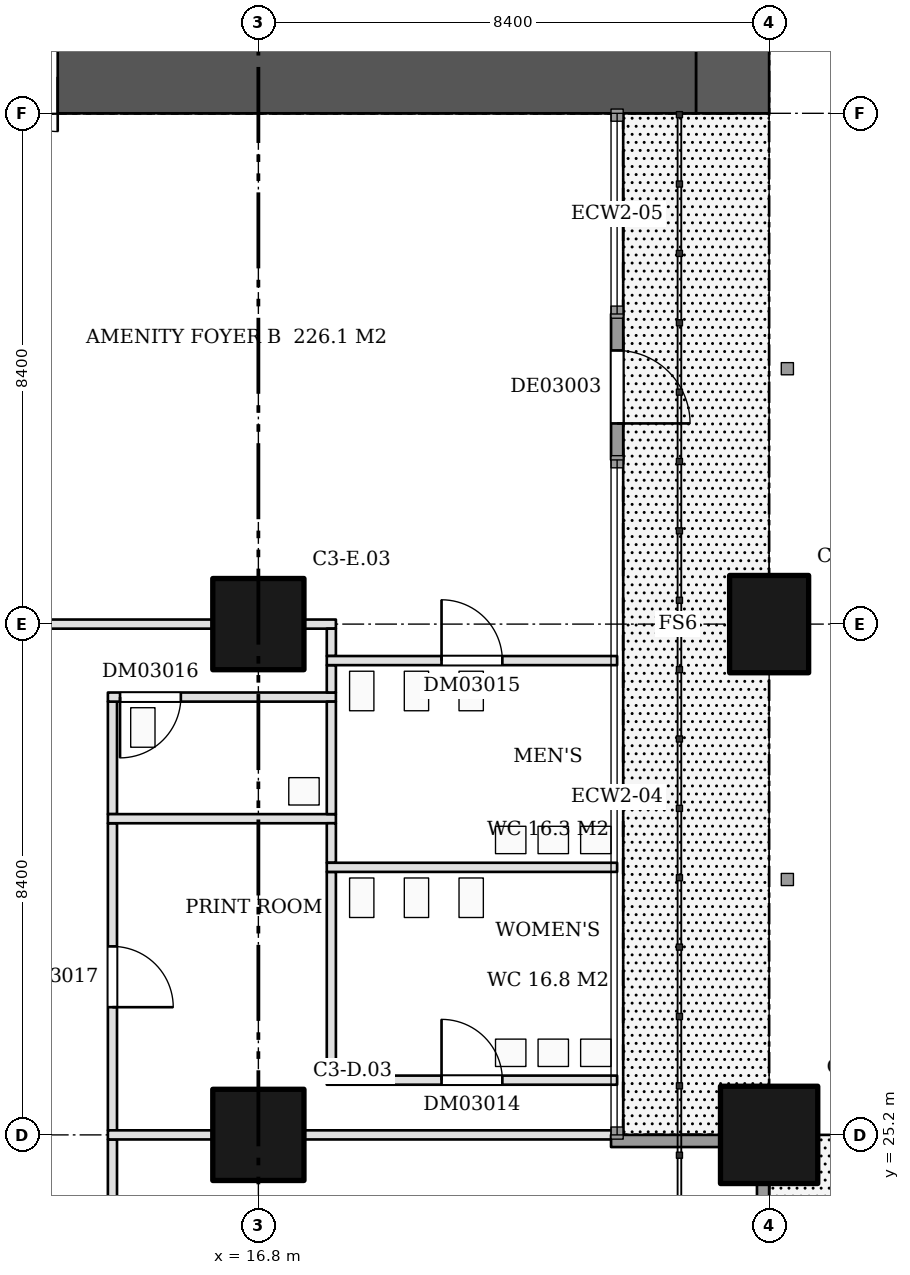
"""IFC4 building model, lengths in metres.
Left out: names, types, materials, properties, quantities, classifications, styles, units other than length and angle.
Written with IfcOpenShell. Run it as: python <this file> out.ifc"""

import sys

from ifc_helpers import new_model, si_unit, direction, frame, frame_2d, origin, origin_2d, place, context, subcontext, project, spatial, rectangle, extrude, element, fill, save


model = new_model("IFC4")
c1 = context("Model", 3, precision=1e-05, world=origin(), true_north=direction((0.0, 1.0)))
c2 = subcontext(c1, "Body", "Model", "MODEL_VIEW")
j1 = project(units=[si_unit("LENGTHUNIT", "METRE"), si_unit("PLANEANGLEUNIT", "RADIAN")], contexts=[c1])
p1 = place(None, origin())
s1 = spatial("IfcSite", under=j1, at=p1, CompositionType="ELEMENT")
p2 = place(p1, origin())
s2 = spatial("IfcBuilding", under=s1, at=p2, CompositionType="ELEMENT")
p3 = place(p2, frame((0.0, 0.0, 19.8)))
s3 = spatial("IfcBuildingStorey", under=s2, at=p3, CompositionType="ELEMENT", Elevation=19.8)
for number, where, z_axis, x_axis in (
    (1, (16.8, 25.2, 0.0), (0.0, 0.0, 1.0), (1.0, 0.0, 0.0)),
    (2, (16.8, 33.6, 0.0), (0.0, 0.0, 1.0), (1.0, 0.0, 0.0)),
):
    element("IfcColumn", number, at=place(p3, frame(where, z_axis=z_axis, x_axis=x_axis)), inside=s3, PredefinedType="COLUMN", context=c2, shape_type="SweptSolid", body=[
        extrude(rectangle(XDim=1.5, YDim=1.5, at=origin_2d()), origin(), (0.0, 0.0, 1.0), 5.12),
    ])
p4 = place(p3, frame((25.2, 25.2, 0.0), z_axis=(0.0, 0.0, 1.0), x_axis=(1.0, 0.0, 0.0)))
e3 = element("IfcColumn", 3, at=p4, inside=s3, PredefinedType="COLUMN", context=c2, shape_type="SweptSolid", body=[
    extrude(rectangle(XDim=1.6, YDim=1.6, at=origin_2d()), origin(), (0.0, 0.0, 1.0), 5.12),
])
p5 = place(p3, frame((25.2, 33.6, 0.0), z_axis=(0.0, 0.0, 1.0), x_axis=(0.0, 1.0, 0.0)))
e4 = element("IfcColumn", 4, at=p5, inside=s3, PredefinedType="COLUMN", context=c2, shape_type="SweptSolid", body=[
    extrude(rectangle(XDim=1.6, YDim=1.3, at=origin_2d()), origin(), (0.0, 0.0, 1.0), 5.12),
])
p6 = place(p3, frame((24.6, 58.8, 0.0), z_axis=(0.0, 0.0, 1.0), x_axis=(0.0, -1.0, 0.0)))
e5 = element("IfcWall", 5, at=p6, inside=s3, PredefinedType="SHEAR", context=c2, shape_type="SweptSolid", body=[
    extrude(rectangle(XDim=16.8, YDim=1.2, at=frame_2d((8.4, 0.0))), origin(), (0.0, 0.0, 1.0), 5.12),
])
p7 = place(p6, frame((1.8, 0.0, 0.5)))
e6 = element("IfcOpeningElement", 6, at=p7, cuts=e5, PredefinedType="OPENING", context=c2, shape_type="SweptSolid", body=[
    extrude(rectangle(XDim=1.8, YDim=2.4, at=frame_2d((0.9, 1.2))), frame((0.0, 0.61, 0.0), z_axis=(0.0, -1.0, 0.0), x_axis=(1.0, 0.0, 0.0)), (0.0, 0.0, 1.0), 1.22),
])
p8 = place(p6, frame((4.644, 0.0, 1.6)))
e7 = element("IfcOpeningElement", 7, at=p8, cuts=e5, PredefinedType="OPENING", context=c2, shape_type="SweptSolid", body=[
    extrude(rectangle(XDim=1.2, YDim=1.2, at=frame_2d((0.6, 0.6))), frame((0.0, 0.61, 0.0), z_axis=(0.0, -1.0, 0.0), x_axis=(1.0, 0.0, 0.0)), (0.0, 0.0, 1.0), 1.22),
])
p9 = place(p6, frame((6.45, 0.0, 1.6)))
e8 = element("IfcOpeningElement", 8, at=p9, cuts=e5, PredefinedType="OPENING", context=c2, shape_type="SweptSolid", body=[
    extrude(rectangle(XDim=1.8, YDim=1.2, at=frame_2d((0.9, 0.6))), frame((0.0, 0.61, 0.0), z_axis=(0.0, -1.0, 0.0), x_axis=(1.0, 0.0, 0.0)), (0.0, 0.0, 1.0), 1.22),
])
p10 = place(p6, frame((12.65, 0.0, 0.5)))
e9 = element("IfcOpeningElement", 9, at=p10, cuts=e5, PredefinedType="OPENING", context=c2, shape_type="SweptSolid", body=[
    extrude(rectangle(XDim=1.8, YDim=2.4, at=frame_2d((0.9, 1.2))), frame((0.0, 0.61, 0.0), z_axis=(0.0, -1.0, 0.0), x_axis=(1.0, 0.0, 0.0)), (0.0, 0.0, 1.0), 1.22),
])
p11 = place(p3, frame((9.6, 42.6, 0.0), z_axis=(0.0, 0.0, 1.0), x_axis=(1.0, 0.0, 0.0)))
e10 = element("IfcWall", 10, at=p11, inside=s3, PredefinedType="SHEAR", context=c2, shape_type="SweptSolid", body=[
    extrude(rectangle(XDim=14.4, YDim=1.2, at=frame_2d((7.2, 0.0))), origin(), (0.0, 0.0, 1.0), 5.12),
])
p12 = place(p11, frame((2.1, 0.0, 0.0)))
e11 = element("IfcOpeningElement", 11, at=p12, cuts=e10, PredefinedType="OPENING", context=c2, shape_type="SweptSolid", body=[
    extrude(rectangle(XDim=1.8, YDim=2.1, at=frame_2d((0.9, 1.05))), frame((0.0, 0.61, 0.0), z_axis=(0.0, -1.0, 0.0), x_axis=(1.0, 0.0, 0.0)), (0.0, 0.0, 1.0), 1.22),
])
p13 = place(p3, frame((10.8, 33.6, 0.0), z_axis=(0.0, 0.0, 1.0), x_axis=(1.0, 0.0, 0.0)))
e12 = element("IfcWall", 12, at=p13, inside=s3, PredefinedType="PARTITIONING", context=c2, shape_type="SweptSolid", body=[
    extrude(rectangle(XDim=5.25, YDim=0.15, at=frame_2d((2.625, 0.0))), origin(), (0.0, 0.0, 1.0), 5.12),
])
p14 = place(p3, frame((17.55, 33.6, 0.0), z_axis=(0.0, 0.0, 1.0), x_axis=(1.0, 0.0, 0.0)))
e13 = element("IfcWall", 13, at=p14, inside=s3, PredefinedType="PARTITIONING", context=c2, shape_type="SweptSolid", body=[
    extrude(rectangle(XDim=0.525, YDim=0.15, at=frame_2d((0.262, 0.0))), origin(), (0.0, 0.0, 1.0), 5.12),
])
p15 = place(p3, frame((14.4, 20.8, 0.0), z_axis=(0.0, 0.0, 1.0), x_axis=(0.0, 1.0, 0.0)))
e14 = element("IfcWall", 14, at=p15, inside=s3, PredefinedType="PARTITIONING", context=c2, shape_type="SweptSolid", body=[
    extrude(rectangle(XDim=4.325, YDim=0.15, at=frame_2d((2.163, 0.0))), origin(), (0.0, 0.0, 1.0), 5.12),
])
p16 = place(p15, frame((1.262, 0.0, 0.0)))
e15 = element("IfcOpeningElement", 15, at=p16, cuts=e14, PredefinedType="OPENING", context=c2, shape_type="SweptSolid", body=[
    extrude(rectangle(XDim=1.8, YDim=2.1, at=frame_2d((0.9, 1.05))), frame((0.0, 0.085, 0.0), z_axis=(0.0, -1.0, 0.0), x_axis=(1.0, 0.0, 0.0)), (0.0, 0.0, 1.0), 0.17),
])
p17 = place(p3, frame((14.4, 25.275, 0.0), z_axis=(0.0, 0.0, 1.0), x_axis=(0.0, 1.0, 0.0)))
e16 = element("IfcWall", 16, at=p17, inside=s3, PredefinedType="PARTITIONING", context=c2, shape_type="SweptSolid", body=[
    extrude(rectangle(XDim=5.05, YDim=0.15, at=frame_2d((2.525, 0.0))), origin(), (0.0, 0.0, 1.0), 5.12),
])
p18 = place(p17, frame((2.025, 0.0, 0.0)))
e17 = element("IfcOpeningElement", 17, at=p18, cuts=e16, PredefinedType="OPENING", context=c2, shape_type="SweptSolid", body=[
    extrude(rectangle(XDim=1.0, YDim=2.1, at=frame_2d((0.5, 1.05))), frame((0.0, 0.085, 0.0), z_axis=(0.0, -1.0, 0.0), x_axis=(1.0, 0.0, 0.0)), (0.0, 0.0, 1.0), 0.17),
])
p19 = place(p3, frame((14.325, 25.2, 0.0), z_axis=(0.0, 0.0, 1.0), x_axis=(1.0, 0.0, 0.0)))
e18 = element("IfcWall", 18, at=p19, inside=s3, PredefinedType="PARTITIONING", context=c2, shape_type="SweptSolid", body=[
    extrude(rectangle(XDim=1.725, YDim=0.15, at=frame_2d((0.863, 0.0))), origin(), (0.0, 0.0, 1.0), 5.12),
])
p20 = place(p3, frame((17.55, 25.2, 0.0), z_axis=(0.0, 0.0, 1.0), x_axis=(1.0, 0.0, 0.0)))
e19 = element("IfcWall", 19, at=p20, inside=s3, PredefinedType="PARTITIONING", context=c2, shape_type="SweptSolid", body=[
    extrude(rectangle(XDim=5.15, YDim=0.15, at=frame_2d((2.575, 0.0))), origin(), (0.0, 0.0, 1.0), 5.12),
])
p21 = place(p3, frame((14.4, 30.475, 0.0), z_axis=(0.0, 0.0, 1.0), x_axis=(0.0, 1.0, 0.0)))
e20 = element("IfcWall", 20, at=p21, inside=s3, PredefinedType="PARTITIONING", context=c2, shape_type="SweptSolid", body=[
    extrude(rectangle(XDim=1.85, YDim=0.15, at=frame_2d((0.925, 0.0))), origin(), (0.0, 0.0, 1.0), 5.12),
])
p22 = place(p3, frame((14.325, 30.4, 0.0), z_axis=(0.0, 0.0, 1.0), x_axis=(1.0, 0.0, 0.0)))
e21 = element("IfcWall", 21, at=p22, inside=s3, PredefinedType="PARTITIONING", context=c2, shape_type="SweptSolid", body=[
    extrude(rectangle(XDim=3.75, YDim=0.15, at=frame_2d((1.875, 0.0))), origin(), (0.0, 0.0, 1.0), 5.12),
])
p23 = place(p3, frame((14.325, 32.4, 0.0), z_axis=(0.0, 0.0, 1.0), x_axis=(1.0, 0.0, 0.0)))
e22 = element("IfcWall", 22, at=p23, inside=s3, PredefinedType="PARTITIONING", context=c2, shape_type="SweptSolid", body=[
    extrude(rectangle(XDim=3.75, YDim=0.15, at=frame_2d((1.875, 0.0))), origin(), (0.0, 0.0, 1.0), 5.12),
])
p24 = place(p23, frame((0.2, 0.0, 0.0)))
e23 = element("IfcOpeningElement", 23, at=p24, cuts=e22, PredefinedType="OPENING", context=c2, shape_type="SweptSolid", body=[
    extrude(rectangle(XDim=1.0, YDim=2.1, at=frame_2d((0.5, 1.05))), frame((0.0, 0.085, 0.0), z_axis=(0.0, -1.0, 0.0), x_axis=(1.0, 0.0, 0.0)), (0.0, 0.0, 1.0), 0.17),
])
p25 = place(p3, frame((18.0, 26.175, 0.0), z_axis=(0.0, 0.0, 1.0), x_axis=(0.0, 1.0, 0.0)))
e24 = element("IfcWall", 24, at=p25, inside=s3, PredefinedType="PARTITIONING", context=c2, shape_type="SweptSolid", body=[
    extrude(rectangle(XDim=3.35, YDim=0.15, at=frame_2d((1.675, 0.0))), origin(), (0.0, 0.0, 1.0), 5.12),
])
p26 = place(p3, frame((17.925, 26.1, 0.0), z_axis=(0.0, 0.0, 1.0), x_axis=(1.0, 0.0, 0.0)))
e25 = element("IfcWall", 25, at=p26, inside=s3, PredefinedType="PARTITIONING", context=c2, shape_type="SweptSolid", body=[
    extrude(rectangle(XDim=4.775, YDim=0.15, at=frame_2d((2.387, 0.0))), origin(), (0.0, 0.0, 1.0), 5.12),
])
p27 = place(p26, frame((1.887, 0.0, 0.0)))
e26 = element("IfcOpeningElement", 26, at=p27, cuts=e25, PredefinedType="OPENING", context=c2, shape_type="SweptSolid", body=[
    extrude(rectangle(XDim=1.0, YDim=2.1, at=frame_2d((0.5, 1.05))), frame((0.0, 0.085, 0.0), z_axis=(0.0, -1.0, 0.0), x_axis=(1.0, 0.0, 0.0)), (0.0, 0.0, 1.0), 0.17),
])
p28 = place(p3, frame((18.0, 29.675, 0.0), z_axis=(0.0, 0.0, 1.0), x_axis=(0.0, 1.0, 0.0)))
e27 = element("IfcWall", 27, at=p28, inside=s3, PredefinedType="PARTITIONING", context=c2, shape_type="SweptSolid", body=[
    extrude(rectangle(XDim=0.65, YDim=0.15, at=frame_2d((0.325, 0.0))), origin(), (0.0, 0.0, 1.0), 5.12),
])
p29 = place(p3, frame((17.925, 29.6, 0.0), z_axis=(0.0, 0.0, 1.0), x_axis=(1.0, 0.0, 0.0)))
e28 = element("IfcWall", 28, at=p29, inside=s3, PredefinedType="PARTITIONING", context=c2, shape_type="SweptSolid", body=[
    extrude(rectangle(XDim=4.775, YDim=0.15, at=frame_2d((2.387, 0.0))), origin(), (0.0, 0.0, 1.0), 5.12),
])
p30 = place(p3, frame((18.0, 30.475, 0.0), z_axis=(0.0, 0.0, 1.0), x_axis=(0.0, 1.0, 0.0)))
e29 = element("IfcWall", 29, at=p30, inside=s3, PredefinedType="PARTITIONING", context=c2, shape_type="SweptSolid", body=[
    extrude(rectangle(XDim=1.85, YDim=0.15, at=frame_2d((0.925, 0.0))), origin(), (0.0, 0.0, 1.0), 5.12),
])
for number, where, z_axis, x_axis in (
    (30, (18.0, 32.475, 0.0), (0.0, 0.0, 1.0), (0.0, 1.0, 0.0)),
    (31, (18.0, 33.075, 0.0), (0.0, 0.0, 1.0), (0.0, 1.0, 0.0)),
):
    element("IfcWall", number, at=place(p3, frame(where, z_axis=z_axis, x_axis=x_axis)), inside=s3, PredefinedType="PARTITIONING", context=c2, shape_type="SweptSolid", body=[
        extrude(rectangle(XDim=0.45, YDim=0.15, at=frame_2d((0.225, 0.0))), origin(), (0.0, 0.0, 1.0), 5.12),
    ])
p31 = place(p3, frame((17.925, 33.0, 0.0), z_axis=(0.0, 0.0, 1.0), x_axis=(1.0, 0.0, 0.0)))
e32 = element("IfcWall", 32, at=p31, inside=s3, PredefinedType="PARTITIONING", context=c2, shape_type="SweptSolid", body=[
    extrude(rectangle(XDim=4.775, YDim=0.15, at=frame_2d((2.387, 0.0))), origin(), (0.0, 0.0, 1.0), 5.12),
])
p32 = place(p31, frame((1.887, 0.0, 0.0)))
e33 = element("IfcOpeningElement", 33, at=p32, cuts=e32, PredefinedType="OPENING", context=c2, shape_type="SweptSolid", body=[
    extrude(rectangle(XDim=1.0, YDim=2.1, at=frame_2d((0.5, 1.05))), frame((0.0, 0.085, 0.0), z_axis=(0.0, -1.0, 0.0), x_axis=(1.0, 0.0, 0.0)), (0.0, 0.0, 1.0), 0.17),
])
p33 = place(p3, frame((25.1, 22.8, 0.0), z_axis=(0.0, 0.0, 1.0), x_axis=(0.0, 1.0, 0.0)))
e34 = element("IfcWall", 34, at=p33, inside=s3, PredefinedType="SOLIDWALL", context=c2, shape_type="SweptSolid", body=[
    extrude(rectangle(XDim=1.6, YDim=0.2, at=frame_2d((0.8, 0.0))), origin(), (0.0, 0.0, 1.0), 5.12),
])
p34 = place(p3, frame((24.4, 25.1, 0.0), z_axis=(0.0, 0.0, 1.0), x_axis=(-1.0, 0.0, 0.0)))
e35 = element("IfcWall", 35, at=p34, inside=s3, PredefinedType="SOLIDWALL", context=c2, shape_type="SweptSolid", body=[
    extrude(rectangle(XDim=1.8, YDim=0.2, at=frame_2d((0.9, 0.0))), origin(), (0.0, 0.0, 1.0), 5.12),
])
p35 = place(p3, frame((22.7, 36.3, 0.0), z_axis=(0.0, 0.0, 1.0), x_axis=(0.0, 1.0, 0.0)))
e36 = element("IfcWall", 36, at=p35, inside=s3, PredefinedType="SOLIDWALL", context=c2, shape_type="SweptSolid", body=[
    extrude(rectangle(XDim=2.4, YDim=0.2, at=frame_2d((1.2, 0.0))), origin(), (0.0, 0.0, 1.0), 5.12),
])
p36 = place(p35, frame((0.6, 0.0, 0.0)))
e37 = element("IfcOpeningElement", 37, at=p36, cuts=e36, PredefinedType="OPENING", context=c2, shape_type="SweptSolid", body=[
    extrude(rectangle(XDim=1.2, YDim=2.4, at=frame_2d((0.6, 1.2))), frame((0.0, 0.11, 0.0), z_axis=(0.0, -1.0, 0.0), x_axis=(1.0, 0.0, 0.0)), (0.0, 0.0, 1.0), 0.22),
])
p37 = place(p12, frame((1.8, 0.0, 0.0), z_axis=(0.0, 0.0, 1.0), x_axis=(-1.0, 0.0, 0.0)))
e38 = element("IfcDoor", 38, at=p37, inside=s3, OperationType="DOUBLE_DOOR_SINGLE_SWING", PredefinedType="DOOR", context=c2, shape_type="SweptSolid", body=[
    extrude(rectangle(XDim=1.8, YDim=2.1, at=frame_2d((0.9, 1.05))), frame((0.0, 0.025, 0.0), z_axis=(0.0, -1.0, 0.0), x_axis=(1.0, 0.0, 0.0)), (0.0, 0.0, 1.0), 0.05),
])
fill(e11, e38)
p38 = place(p27, origin())
e39 = element("IfcDoor", 39, at=p38, inside=s3, OperationType="SINGLE_SWING_LEFT", PredefinedType="DOOR", context=c2, shape_type="SweptSolid", body=[
    extrude(rectangle(XDim=1.0, YDim=2.1, at=frame_2d((0.5, 1.05))), frame((0.0, 0.025, 0.0), z_axis=(0.0, -1.0, 0.0), x_axis=(1.0, 0.0, 0.0)), (0.0, 0.0, 1.0), 0.05),
])
fill(e26, e39)
p39 = place(p32, origin())
e40 = element("IfcDoor", 40, at=p39, inside=s3, OperationType="SINGLE_SWING_LEFT", PredefinedType="DOOR", context=c2, shape_type="SweptSolid", body=[
    extrude(rectangle(XDim=1.0, YDim=2.1, at=frame_2d((0.5, 1.05))), frame((0.0, 0.025, 0.0), z_axis=(0.0, -1.0, 0.0), x_axis=(1.0, 0.0, 0.0)), (0.0, 0.0, 1.0), 0.05),
])
fill(e33, e40)
p40 = place(p24, frame((1.0, 0.0, 0.0), z_axis=(0.0, 0.0, 1.0), x_axis=(-1.0, 0.0, 0.0)))
e41 = element("IfcDoor", 41, at=p40, inside=s3, OperationType="SINGLE_SWING_RIGHT", PredefinedType="DOOR", context=c2, shape_type="SweptSolid", body=[
    extrude(rectangle(XDim=1.0, YDim=2.1, at=frame_2d((0.5, 1.05))), frame((0.0, 0.025, 0.0), z_axis=(0.0, -1.0, 0.0), x_axis=(1.0, 0.0, 0.0)), (0.0, 0.0, 1.0), 0.05),
])
fill(e23, e41)
p41 = place(p18, frame((1.0, 0.0, 0.0), z_axis=(0.0, 0.0, 1.0), x_axis=(-1.0, 0.0, 0.0)))
e42 = element("IfcDoor", 42, at=p41, inside=s3, OperationType="SINGLE_SWING_RIGHT", PredefinedType="DOOR", context=c2, shape_type="SweptSolid", body=[
    extrude(rectangle(XDim=1.0, YDim=2.1, at=frame_2d((0.5, 1.05))), frame((0.0, 0.025, 0.0), z_axis=(0.0, -1.0, 0.0), x_axis=(1.0, 0.0, 0.0)), (0.0, 0.0, 1.0), 0.05),
])
fill(e17, e42)
p42 = place(p36, frame((1.2, 0.0, 0.0), z_axis=(0.0, 0.0, 1.0), x_axis=(-1.0, 0.0, 0.0)))
e43 = element("IfcDoor", 43, at=p42, inside=s3, OperationType="SINGLE_SWING_RIGHT", PredefinedType="DOOR", context=c2, shape_type="SweptSolid", body=[
    extrude(rectangle(XDim=1.2, YDim=2.4, at=frame_2d((0.6, 1.2))), frame((0.0, 0.025, 0.0), z_axis=(0.0, -1.0, 0.0), x_axis=(1.0, 0.0, 0.0)), (0.0, 0.0, 1.0), 0.05),
])
fill(e37, e43)
save(model, sys.argv[1])
